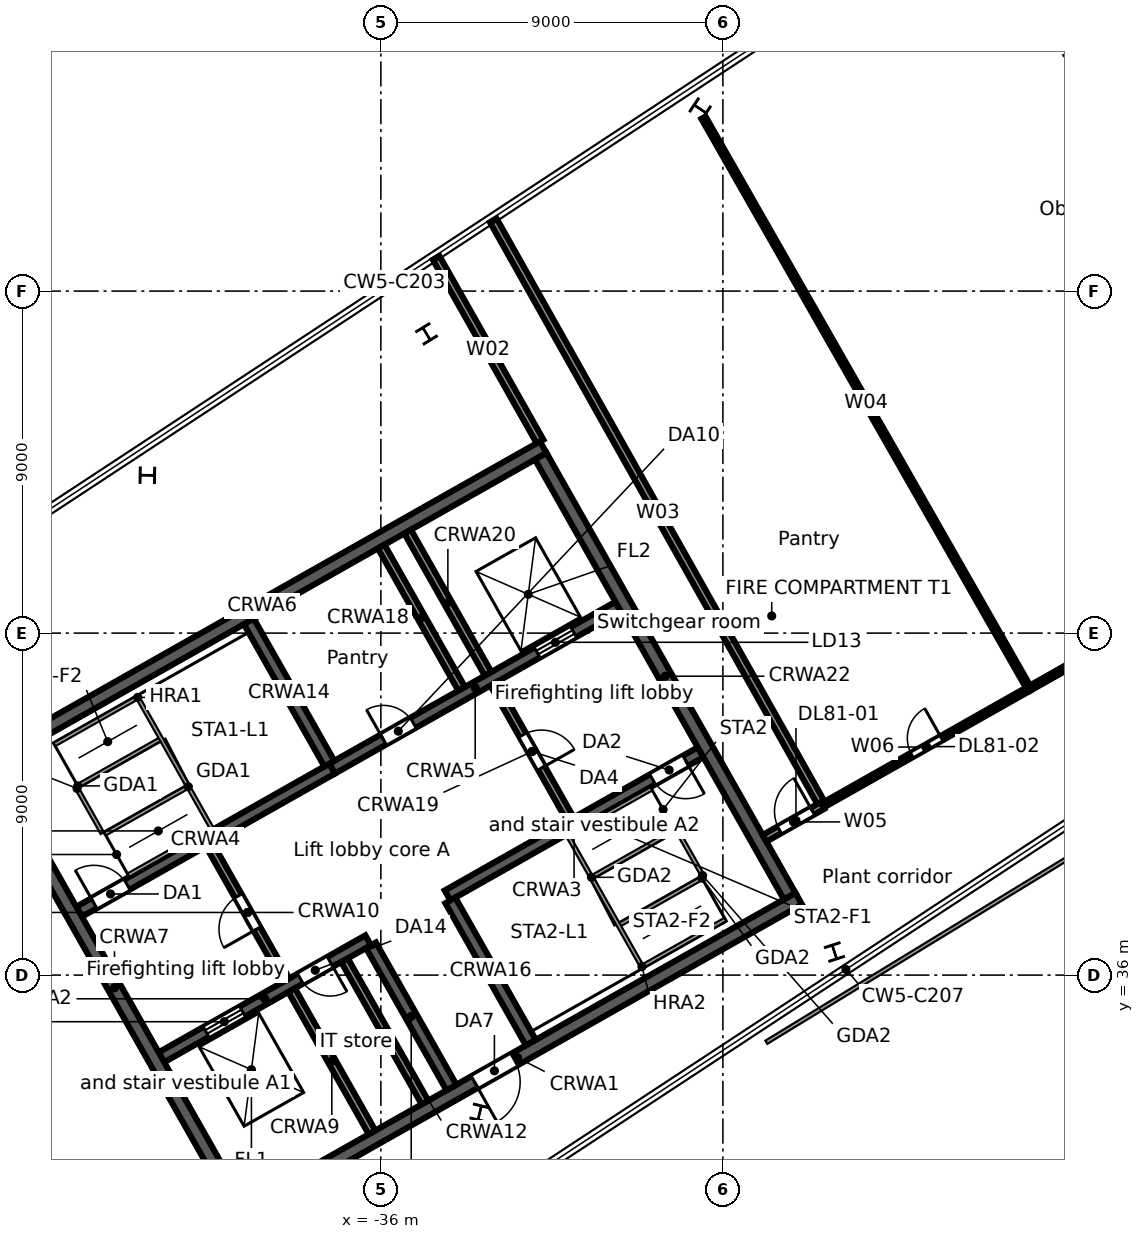
"""IFC4 building model, lengths in metres.
Left out: names, types, materials, properties, quantities, classifications, styles, units other than length and angle.
Written with IfcOpenShell. Run it as: python <this file> out.ifc"""

import sys

from ifc_helpers import new_model, si_unit, direction, frame, frame_2d, origin, origin_2d, place, context, subcontext, project, spatial, rectangle, i_section, extrude, element, fill, save


model = new_model("IFC4")
c1 = context("Model", 3, precision=1e-05, world=origin(), true_north=direction((0.0, 1.0)))
c2 = subcontext(c1, "Body", "Model", "MODEL_VIEW")
j1 = project(units=[si_unit("LENGTHUNIT", "METRE"), si_unit("PLANEANGLEUNIT", "RADIAN")], contexts=[c1])
p1 = place(None, origin())
s1 = spatial("IfcSite", under=j1, at=p1, CompositionType="ELEMENT")
p2 = place(p1, origin())
s2 = spatial("IfcBuilding", under=s1, at=p2, CompositionType="ELEMENT")
p3 = place(p2, frame((0.0, 0.0, 354.1)))
s3 = spatial("IfcBuildingStorey", under=s2, at=p3, CompositionType="ELEMENT", Elevation=354.1)
for number, where, z_axis, x_axis in (
    (1, (-17.957, 60.462, -0.3), (0.0, 0.0, 1.0), (0.87, 0.492, 0.0)),
    (2, (-27.598, 58.793, -0.3), (0.0, 0.0, 1.0), (0.558, 0.83, 0.0)),
    (3, (-34.798, 52.875, -0.3), (0.0, 0.0, 1.0), (0.853, 0.521, 0.0)),
    (4, (-42.144, 49.153, -0.3), (0.0, 0.0, 1.0), (0.018, 1.0, 0.0)),
    (5, (-33.4, 32.374, -0.3), (0.0, 0.0, 1.0), (-0.971, 0.239, 0.0)),
    (6, (-24.065, 36.607, -0.3), (0.0, 0.0, 1.0), (-0.952, -0.307, 0.0)),
):
    element("IfcColumn", number, at=place(p3, frame(where, z_axis=z_axis, x_axis=x_axis)), inside=s3, PredefinedType="COLUMN", context=c2, shape_type="SweptSolid", body=[
        extrude(i_section(OverallWidth=0.4, OverallDepth=0.4, WebThickness=0.013, FlangeThickness=0.021, FilletRadius=0.022, at=origin_2d()), origin(), (0.0, 0.0, 1.0), 3.9),
    ])
p4 = place(p3, frame((-44.119, 26.51, 0.0), z_axis=(0.0, 0.0, 1.0), x_axis=(-0.857172484352, 0.515029447769, 0.0)))
e7 = element("IfcWall", 7, at=p4, inside=s3, PredefinedType="STANDARD", context=c2, shape_type="SweptSolid", body=[
    extrude(rectangle(XDim=17.084, YDim=0.2, at=frame_2d((8.542, 0.0))), origin(), (0.0, 0.0, 1.0), 3.3),
])
p5 = place(p3, frame((-39.801, 29.64, 0.0), z_axis=(0.0, 0.0, 1.0), x_axis=(0.870359753402, 0.492416388494, 0.0)))
e8 = element("IfcWall", 8, at=p5, inside=s3, PredefinedType="SOLIDWALL", context=c2, shape_type="SweptSolid", body=[
    extrude(rectangle(XDim=17.0, YDim=0.35, at=frame_2d((8.5, 0.0))), origin(), (0.0, 0.0, 1.0), 3.3),
])
p6 = place(p5, frame((7.2, 0.0, 0.0)))
e9 = element("IfcOpeningElement", 9, at=p6, cuts=e8, PredefinedType="OPENING", context=c2, shape_type="SweptSolid", body=[
    extrude(rectangle(XDim=1.2, YDim=2.1, at=frame_2d((0.6, 1.05))), frame((0.0, 0.185, 0.0), z_axis=(0.0, -1.0, 0.0), x_axis=(1.0, 0.0, 0.0)), (0.0, 0.0, 1.0), 0.37),
])
p7 = place(p3, frame((-41.774, 33.838, 0.0), z_axis=(0.0, 0.0, 1.0), x_axis=(0.870355415866, 0.492424055132, 0.0)))
e10 = element("IfcWall", 10, at=p7, inside=s3, PredefinedType="SOLIDWALL", context=c2, shape_type="SweptSolid", body=[
    extrude(rectangle(XDim=6.25, YDim=0.3, at=frame_2d((3.125, 0.0))), origin(), (0.0, 0.0, 1.0), 3.3),
])
p8 = place(p7, frame((1.35, 0.0, 0.0)))
e11 = element("IfcOpeningElement", 11, at=p8, cuts=e10, PredefinedType="OPENING", context=c2, shape_type="SweptSolid", body=[
    extrude(rectangle(XDim=1.1, YDim=2.1, at=frame_2d((0.55, 1.05))), frame((0.0, 0.16, 0.0), z_axis=(0.0, -1.0, 0.0), x_axis=(1.0, 0.0, 0.0)), (0.0, 0.0, 1.0), 0.32),
])
p9 = place(p7, frame((4.2, 0.0, 0.0)))
e12 = element("IfcOpeningElement", 12, at=p9, cuts=e10, PredefinedType="OPENING", context=c2, shape_type="SweptSolid", body=[
    extrude(rectangle(XDim=0.9, YDim=2.1, at=frame_2d((0.45, 1.05))), frame((0.0, 0.16, 0.0), z_axis=(0.0, -1.0, 0.0), x_axis=(1.0, 0.0, 0.0)), (0.0, 0.0, 1.0), 0.32),
])
p10 = place(p3, frame((-34.245, 38.097, 0.0), z_axis=(0.0, 0.0, 1.0), x_axis=(0.870352347706, 0.49242947804, 0.0)))
e13 = element("IfcWall", 13, at=p10, inside=s3, PredefinedType="SOLIDWALL", context=c2, shape_type="SweptSolid", body=[
    extrude(rectangle(XDim=7.65, YDim=0.3, at=frame_2d((3.825, 0.0))), origin(), (0.0, 0.0, 1.0), 3.3),
])
p11 = place(p10, frame((6.2, 0.0, 0.0)))
e14 = element("IfcOpeningElement", 14, at=p11, cuts=e13, PredefinedType="OPENING", context=c2, shape_type="SweptSolid", body=[
    extrude(rectangle(XDim=1.0, YDim=2.1, at=frame_2d((0.5, 1.05))), frame((0.0, 0.16, 0.0), z_axis=(0.0, -1.0, 0.0), x_axis=(1.0, 0.0, 0.0)), (0.0, 0.0, 1.0), 0.32),
])
p12 = place(p3, frame((-43.94, 37.667, 0.0), z_axis=(0.0, 0.0, 1.0), x_axis=(0.870352347706, 0.49242947804, 0.0)))
e15 = element("IfcWall", 15, at=p12, inside=s3, PredefinedType="SOLIDWALL", context=c2, shape_type="SweptSolid", body=[
    extrude(rectangle(XDim=7.65, YDim=0.3, at=frame_2d((3.825, 0.0))), origin(), (0.0, 0.0, 1.0), 3.3),
])
p13 = place(p12, frame((0.45, 0.0, 0.0)))
e16 = element("IfcOpeningElement", 16, at=p13, cuts=e15, PredefinedType="OPENING", context=c2, shape_type="SweptSolid", body=[
    extrude(rectangle(XDim=1.0, YDim=2.1, at=frame_2d((0.5, 1.05))), frame((0.0, 0.16, 0.0), z_axis=(0.0, -1.0, 0.0), x_axis=(1.0, 0.0, 0.0)), (0.0, 0.0, 1.0), 0.32),
])
p14 = place(p3, frame((-37.282, 41.435, 0.0), z_axis=(0.0, 0.0, 1.0), x_axis=(0.870364588774, 0.492407841741, 0.0)))
e17 = element("IfcWall", 17, at=p14, inside=s3, PredefinedType="SOLIDWALL", context=c2, shape_type="SweptSolid", body=[
    extrude(rectangle(XDim=8.65, YDim=0.3, at=frame_2d((4.325, 0.0))), origin(), (0.0, 0.0, 1.0), 3.3),
])
p15 = place(p14, frame((6.2, 0.0, 0.0)))
e18 = element("IfcOpeningElement", 18, at=p15, cuts=e17, PredefinedType="OPENING", context=c2, shape_type="SweptSolid", body=[
    extrude(rectangle(XDim=1.1, YDim=2.1, at=frame_2d((0.55, 1.05))), frame((0.0, 0.16, 0.0), z_axis=(0.0, -1.0, 0.0), x_axis=(1.0, 0.0, 0.0)), (0.0, 0.0, 1.0), 0.32),
])
p16 = place(p14, frame((1.55, 0.0, 0.0)))
e19 = element("IfcOpeningElement", 19, at=p16, cuts=e17, PredefinedType="OPENING", context=c2, shape_type="SweptSolid", body=[
    extrude(rectangle(XDim=0.9, YDim=2.1, at=frame_2d((0.45, 1.05))), frame((0.0, 0.16, 0.0), z_axis=(0.0, -1.0, 0.0), x_axis=(1.0, 0.0, 0.0)), (0.0, 0.0, 1.0), 0.32),
])
p17 = place(p3, frame((-46.522, 41.521, 0.0), z_axis=(0.0, 0.0, 1.0), x_axis=(0.870359753402, 0.492416388494, 0.0)))
e20 = element("IfcWall", 20, at=p17, inside=s3, PredefinedType="SOLIDWALL", context=c2, shape_type="SweptSolid", body=[
    extrude(rectangle(XDim=17.0, YDim=0.35, at=frame_2d((8.5, 0.0))), origin(), (0.0, 0.0, 1.0), 3.3),
])
p18 = place(p3, frame((-46.284, 41.454, 0.0), z_axis=(0.0, 0.0, 1.0), x_axis=(0.492429810477, -0.870352159619, 0.0)))
e21 = element("IfcWall", 21, at=p18, inside=s3, PredefinedType="SOLIDWALL", context=c2, shape_type="SweptSolid", body=[
    extrude(rectangle(XDim=13.3, YDim=0.35, at=frame_2d((6.65, 0.0))), origin(), (0.0, 0.0, 1.0), 3.3),
])
p19 = place(p3, frame((-38.349, 35.603, 0.0), z_axis=(0.0, 0.0, 1.0), x_axis=(0.492410799949, -0.870362915164, 0.0)))
e22 = element("IfcWall", 22, at=p19, inside=s3, PredefinedType="SOLIDWALL", context=c2, shape_type="SweptSolid", body=[
    extrude(rectangle(XDim=4.3, YDim=0.2, at=frame_2d((2.15, 0.0))), origin(), (0.0, 0.0, 1.0), 3.3),
])
p20 = place(p3, frame((-40.516, 39.433, 0.0), z_axis=(0.0, 0.0, 1.0), x_axis=(0.492453559952, -0.87033872216, 0.0)))
e23 = element("IfcWall", 23, at=p20, inside=s3, PredefinedType="PARTITIONING", context=c2, shape_type="SweptSolid", body=[
    extrude(rectangle(XDim=4.1, YDim=0.2, at=frame_2d((2.05, 0.0))), origin(), (0.0, 0.0, 1.0), 3.3),
])
p21 = place(p20, frame((1.55, 0.0, 0.0)))
e24 = element("IfcOpeningElement", 24, at=p21, cuts=e23, PredefinedType="OPENING", context=c2, shape_type="SweptSolid", body=[
    extrude(rectangle(XDim=1.0, YDim=2.1, at=frame_2d((0.5, 1.05))), frame((0.0, 0.11, 0.0), z_axis=(0.0, -1.0, 0.0), x_axis=(1.0, 0.0, 0.0)), (0.0, 0.0, 1.0), 0.22),
])
p22 = place(p3, frame((-36.956, 36.391, 0.0), z_axis=(0.0, 0.0, 1.0), x_axis=(0.492410799949, -0.870362915164, 0.0)))
e25 = element("IfcWall", 25, at=p22, inside=s3, PredefinedType="SOLIDWALL", context=c2, shape_type="SweptSolid", body=[
    extrude(rectangle(XDim=4.3, YDim=0.2, at=frame_2d((2.15, 0.0))), origin(), (0.0, 0.0, 1.0), 3.3),
])
p23 = place(p3, frame((-36.26, 36.785, 0.0), z_axis=(0.0, 0.0, 1.0), x_axis=(0.492435133428, -0.870349147967, 0.0)))
e26 = element("IfcWall", 26, at=p23, inside=s3, PredefinedType="SOLIDWALL", context=c2, shape_type="SweptSolid", body=[
    extrude(rectangle(XDim=4.3, YDim=0.3, at=frame_2d((2.15, 0.0))), origin(), (0.0, 0.0, 1.0), 3.3),
])
p24 = place(p3, frame((-39.473, 45.308, 0.0), z_axis=(0.0, 0.0, 1.0), x_axis=(0.492410799949, -0.870362915164, 0.0)))
e27 = element("IfcWall", 27, at=p24, inside=s3, PredefinedType="SOLIDWALL", context=c2, shape_type="SweptSolid", body=[
    extrude(rectangle(XDim=4.3, YDim=0.3, at=frame_2d((2.15, 0.0))), origin(), (0.0, 0.0, 1.0), 3.3),
])
p25 = place(p3, frame((-34.171, 37.967, 0.0), z_axis=(0.0, 0.0, 1.0), x_axis=(0.492435133428, -0.870349147967, 0.0)))
e28 = element("IfcWall", 28, at=p25, inside=s3, PredefinedType="SOLIDWALL", context=c2, shape_type="SweptSolid", body=[
    extrude(rectangle(XDim=4.3, YDim=0.3, at=frame_2d((2.15, 0.0))), origin(), (0.0, 0.0, 1.0), 3.3),
])
p26 = place(p3, frame((-35.992, 47.277, 0.0), z_axis=(0.0, 0.0, 1.0), x_axis=(0.492410799949, -0.870362915164, 0.0)))
e29 = element("IfcWall", 29, at=p26, inside=s3, PredefinedType="SOLIDWALL", context=c2, shape_type="SweptSolid", body=[
    extrude(rectangle(XDim=4.3, YDim=0.2, at=frame_2d((2.15, 0.0))), origin(), (0.0, 0.0, 1.0), 3.3),
])
p27 = place(p3, frame((-33.031, 43.667, 0.0), z_axis=(0.0, 0.0, 1.0), x_axis=(0.492408451753, -0.87036424366, 0.0)))
e30 = element("IfcWall", 30, at=p27, inside=s3, PredefinedType="PARTITIONING", context=c2, shape_type="SweptSolid", body=[
    extrude(rectangle(XDim=4.1, YDim=0.2, at=frame_2d((2.05, 0.0))), origin(), (0.0, 0.0, 1.0), 3.3),
])
p28 = place(p27, frame((1.55, 0.0, 0.0)))
e31 = element("IfcOpeningElement", 31, at=p28, cuts=e30, PredefinedType="OPENING", context=c2, shape_type="SweptSolid", body=[
    extrude(rectangle(XDim=1.0, YDim=2.1, at=frame_2d((0.5, 1.05))), frame((0.0, 0.11, 0.0), z_axis=(0.0, -1.0, 0.0), x_axis=(1.0, 0.0, 0.0)), (0.0, 0.0, 1.0), 0.22),
])
p29 = place(p3, frame((-35.296, 47.671, 0.0), z_axis=(0.0, 0.0, 1.0), x_axis=(0.492435133428, -0.870349147967, 0.0)))
e32 = element("IfcWall", 32, at=p29, inside=s3, PredefinedType="SOLIDWALL", context=c2, shape_type="SweptSolid", body=[
    extrude(rectangle(XDim=4.3, YDim=0.2, at=frame_2d((2.15, 0.0))), origin(), (0.0, 0.0, 1.0), 3.3),
])
p30 = place(p3, frame((-31.792, 49.653, 0.0), z_axis=(0.0, 0.0, 1.0), x_axis=(0.492421943245, -0.870356610712, 0.0)))
e33 = element("IfcWall", 33, at=p30, inside=s3, PredefinedType="SOLIDWALL", context=c2, shape_type="SweptSolid", body=[
    extrude(rectangle(XDim=13.3, YDim=0.35, at=frame_2d((6.65, 0.0))), origin(), (0.0, 0.0, 1.0), 3.3),
])
p31 = place(p3, frame((-34.544, 54.873, 0.0), z_axis=(0.0, 0.0, 1.0), x_axis=(0.492390708412, -0.870374281714, 0.0)))
e34 = element("IfcWall", 34, at=p31, inside=s3, PredefinedType="PARTITIONING", context=c2, shape_type="SweptSolid", body=[
    extrude(rectangle(XDim=5.548, YDim=0.2, at=frame_2d((2.774, 0.0))), origin(), (0.0, 0.0, 1.0), 2.68),
])
p32 = place(p3, frame((-33.042, 55.86, 0.0), z_axis=(0.0, 0.0, 1.0), x_axis=(0.490288138745, -0.871560405828, 0.0)))
e35 = element("IfcWall", 35, at=p32, inside=s3, PredefinedType="PARTITIONING", context=c2, shape_type="SweptSolid", body=[
    extrude(rectangle(XDim=17.667, YDim=0.2, at=frame_2d((8.834, 0.0))), origin(), (0.0, 0.0, 1.0), 2.68),
])
p33 = place(p3, frame((-27.511, 58.564, 0.0), z_axis=(0.0, 0.0, 1.0), x_axis=(0.495459338806, -0.868631132063, 0.0)))
e36 = element("IfcWall", 36, at=p33, inside=s3, PredefinedType="PARTITIONING", context=c2, shape_type="SweptSolid", body=[
    extrude(rectangle(XDim=17.297, YDim=0.125, at=frame_2d((8.648, 0.0))), origin(), (0.0, 0.0, 1.0), 3.3),
])
p34 = place(p3, frame((-25.904, 39.6, 0.0), z_axis=(0.0, 0.0, 1.0), x_axis=(0.870482323294, 0.492199679838, 0.0)))
e37 = element("IfcWall", 37, at=p34, inside=s3, PredefinedType="PARTITIONING", context=c2, shape_type="SweptSolid", body=[
    extrude(rectangle(XDim=1.751, YDim=0.2, at=frame_2d((0.875, 0.0))), origin(), (0.0, 0.0, 1.0), 3.3),
])
p35 = place(p34, frame((0.45, 0.0, 0.0)))
e38 = element("IfcOpeningElement", 38, at=p35, cuts=e37, PredefinedType="OPENING", context=c2, shape_type="SweptSolid", body=[
    extrude(rectangle(XDim=1.0, YDim=2.1, at=frame_2d((0.5, 1.05))), frame((0.0, 0.11, 0.0), z_axis=(0.0, -1.0, 0.0), x_axis=(1.0, 0.0, 0.0)), (0.0, 0.0, 1.0), 0.22),
])
p36 = place(p3, frame((-24.38, 40.462, 0.0), z_axis=(0.0, 0.0, 1.0), x_axis=(0.87036048388, 0.492415097353, 0.0)))
e39 = element("IfcWall", 39, at=p36, inside=s3, PredefinedType="PARTITIONING", context=c2, shape_type="SweptSolid", body=[
    extrude(rectangle(XDim=6.249, YDim=0.125, at=frame_2d((3.125, 0.0))), origin(), (0.0, 0.0, 1.0), 3.3),
])
p37 = place(p36, frame((2.7, 0.0, 0.0)))
e40 = element("IfcOpeningElement", 40, at=p37, cuts=e39, PredefinedType="OPENING", context=c2, shape_type="SweptSolid", body=[
    extrude(rectangle(XDim=0.9, YDim=2.1, at=frame_2d((0.45, 1.05))), frame((0.0, 0.073, 0.0), z_axis=(0.0, -1.0, 0.0), x_axis=(1.0, 0.0, 0.0)), (0.0, 0.0, 1.0), 0.145),
])
p38 = place(p3, frame((-18.941, 43.539, 0.0), z_axis=(0.0, 0.0, 1.0), x_axis=(0.870355301806, 0.492424256733, 0.0)))
e41 = element("IfcWall", 41, at=p38, inside=s3, PredefinedType="PARTITIONING", context=c2, shape_type="SweptSolid", body=[
    extrude(rectangle(XDim=13.216, YDim=0.125, at=frame_2d((6.608, 0.0))), origin(), (0.0, 0.0, 1.0), 2.68),
])
p39 = place(p38, frame((5.7, 0.0, 0.0)))
e42 = element("IfcOpeningElement", 42, at=p39, cuts=e41, PredefinedType="OPENING", context=c2, shape_type="SweptSolid", body=[
    extrude(rectangle(XDim=1.8, YDim=2.1, at=frame_2d((0.9, 1.05))), frame((0.0, 0.073, 0.0), z_axis=(0.0, -1.0, 0.0), x_axis=(1.0, 0.0, 0.0)), (0.0, 0.0, 1.0), 0.145),
])
p40 = place(p15, origin())
e43 = element("IfcDoor", 43, at=p40, inside=s3, OperationType="DOUBLE_DOOR_SLIDING", PredefinedType="DOOR", context=c2, shape_type="SweptSolid", body=[
    extrude(rectangle(XDim=1.1, YDim=2.1, at=frame_2d((0.55, 1.05))), frame((0.0, 0.025, 0.0), z_axis=(0.0, -1.0, 0.0), x_axis=(1.0, 0.0, 0.0)), (0.0, 0.0, 1.0), 0.05),
])
fill(e18, e43)
p41 = place(p8, origin())
e44 = element("IfcDoor", 44, at=p41, inside=s3, OperationType="DOUBLE_DOOR_SLIDING", PredefinedType="DOOR", context=c2, shape_type="SweptSolid", body=[
    extrude(rectangle(XDim=1.1, YDim=2.1, at=frame_2d((0.55, 1.05))), frame((0.0, 0.025, 0.0), z_axis=(0.0, -1.0, 0.0), x_axis=(1.0, 0.0, 0.0)), (0.0, 0.0, 1.0), 0.05),
])
fill(e11, e44)
p42 = place(p13, origin())
e45 = element("IfcDoor", 45, at=p42, inside=s3, OperationType="SINGLE_SWING_LEFT", PredefinedType="DOOR", context=c2, shape_type="SweptSolid", body=[
    extrude(rectangle(XDim=1.0, YDim=2.1, at=frame_2d((0.5, 1.05))), frame((0.0, 0.025, 0.0), z_axis=(0.0, -1.0, 0.0), x_axis=(1.0, 0.0, 0.0)), (0.0, 0.0, 1.0), 0.05),
])
fill(e16, e45)
p43 = place(p11, frame((1.0, 0.0, 0.0), z_axis=(0.0, 0.0, 1.0), x_axis=(-1.0, 0.0, 0.0)))
e46 = element("IfcDoor", 46, at=p43, inside=s3, OperationType="SINGLE_SWING_LEFT", PredefinedType="DOOR", context=c2, shape_type="SweptSolid", body=[
    extrude(rectangle(XDim=1.0, YDim=2.1, at=frame_2d((0.5, 1.05))), frame((0.0, 0.025, 0.0), z_axis=(0.0, -1.0, 0.0), x_axis=(1.0, 0.0, 0.0)), (0.0, 0.0, 1.0), 0.05),
])
fill(e14, e46)
p44 = place(p21, frame((1.0, 0.0, 0.0), z_axis=(0.0, 0.0, 1.0), x_axis=(-1.0, 0.0, 0.0)))
e47 = element("IfcDoor", 47, at=p44, inside=s3, OperationType="SINGLE_SWING_LEFT", PredefinedType="DOOR", context=c2, shape_type="SweptSolid", body=[
    extrude(rectangle(XDim=1.0, YDim=2.1, at=frame_2d((0.5, 1.05))), frame((0.0, 0.025, 0.0), z_axis=(0.0, -1.0, 0.0), x_axis=(1.0, 0.0, 0.0)), (0.0, 0.0, 1.0), 0.05),
])
fill(e24, e47)
p45 = place(p28, origin())
e48 = element("IfcDoor", 48, at=p45, inside=s3, OperationType="SINGLE_SWING_RIGHT", PredefinedType="DOOR", context=c2, shape_type="SweptSolid", body=[
    extrude(rectangle(XDim=1.0, YDim=2.1, at=frame_2d((0.5, 1.05))), frame((0.0, 0.025, 0.0), z_axis=(0.0, -1.0, 0.0), x_axis=(1.0, 0.0, 0.0)), (0.0, 0.0, 1.0), 0.05),
])
fill(e31, e48)
p46 = place(p6, frame((1.2, 0.0, 0.0), z_axis=(0.0, 0.0, 1.0), x_axis=(-1.0, 0.0, 0.0)))
e49 = element("IfcDoor", 49, at=p46, inside=s3, OperationType="SINGLE_SWING_RIGHT", PredefinedType="DOOR", context=c2, shape_type="SweptSolid", body=[
    extrude(rectangle(XDim=1.2, YDim=2.1, at=frame_2d((0.6, 1.05))), frame((0.0, 0.025, 0.0), z_axis=(0.0, -1.0, 0.0), x_axis=(1.0, 0.0, 0.0)), (0.0, 0.0, 1.0), 0.05),
])
fill(e9, e49)
p47 = place(p16, origin())
e50 = element("IfcDoor", 50, at=p47, inside=s3, OperationType="SINGLE_SWING_LEFT", PredefinedType="DOOR", context=c2, shape_type="SweptSolid", body=[
    extrude(rectangle(XDim=0.9, YDim=2.1, at=frame_2d((0.45, 1.05))), frame((0.0, 0.025, 0.0), z_axis=(0.0, -1.0, 0.0), x_axis=(1.0, 0.0, 0.0)), (0.0, 0.0, 1.0), 0.05),
])
fill(e19, e50)
p48 = place(p9, frame((0.9, 0.0, 0.0), z_axis=(0.0, 0.0, 1.0), x_axis=(-1.0, 0.0, 0.0)))
e51 = element("IfcDoor", 51, at=p48, inside=s3, OperationType="SINGLE_SWING_LEFT", PredefinedType="DOOR", context=c2, shape_type="SweptSolid", body=[
    extrude(rectangle(XDim=0.9, YDim=2.1, at=frame_2d((0.45, 1.05))), frame((0.0, 0.025, 0.0), z_axis=(0.0, -1.0, 0.0), x_axis=(1.0, 0.0, 0.0)), (0.0, 0.0, 1.0), 0.05),
])
fill(e12, e51)
p49 = place(p35, origin())
e52 = element("IfcDoor", 52, at=p49, inside=s3, OperationType="SINGLE_SWING_RIGHT", PredefinedType="DOOR", context=c2, shape_type="SweptSolid", body=[
    extrude(rectangle(XDim=1.0, YDim=2.1, at=frame_2d((0.5, 1.05))), frame((0.0, 0.025, 0.0), z_axis=(0.0, -1.0, 0.0), x_axis=(1.0, 0.0, 0.0)), (0.0, 0.0, 1.0), 0.05),
])
fill(e38, e52)
p50 = place(p37, origin())
e53 = element("IfcDoor", 53, at=p50, inside=s3, OperationType="SINGLE_SWING_RIGHT", PredefinedType="DOOR", context=c2, shape_type="SweptSolid", body=[
    extrude(rectangle(XDim=0.9, YDim=2.1, at=frame_2d((0.45, 1.05))), frame((0.0, 0.025, 0.0), z_axis=(0.0, -1.0, 0.0), x_axis=(1.0, 0.0, 0.0)), (0.0, 0.0, 1.0), 0.05),
])
fill(e40, e53)
save(model, sys.argv[1])
